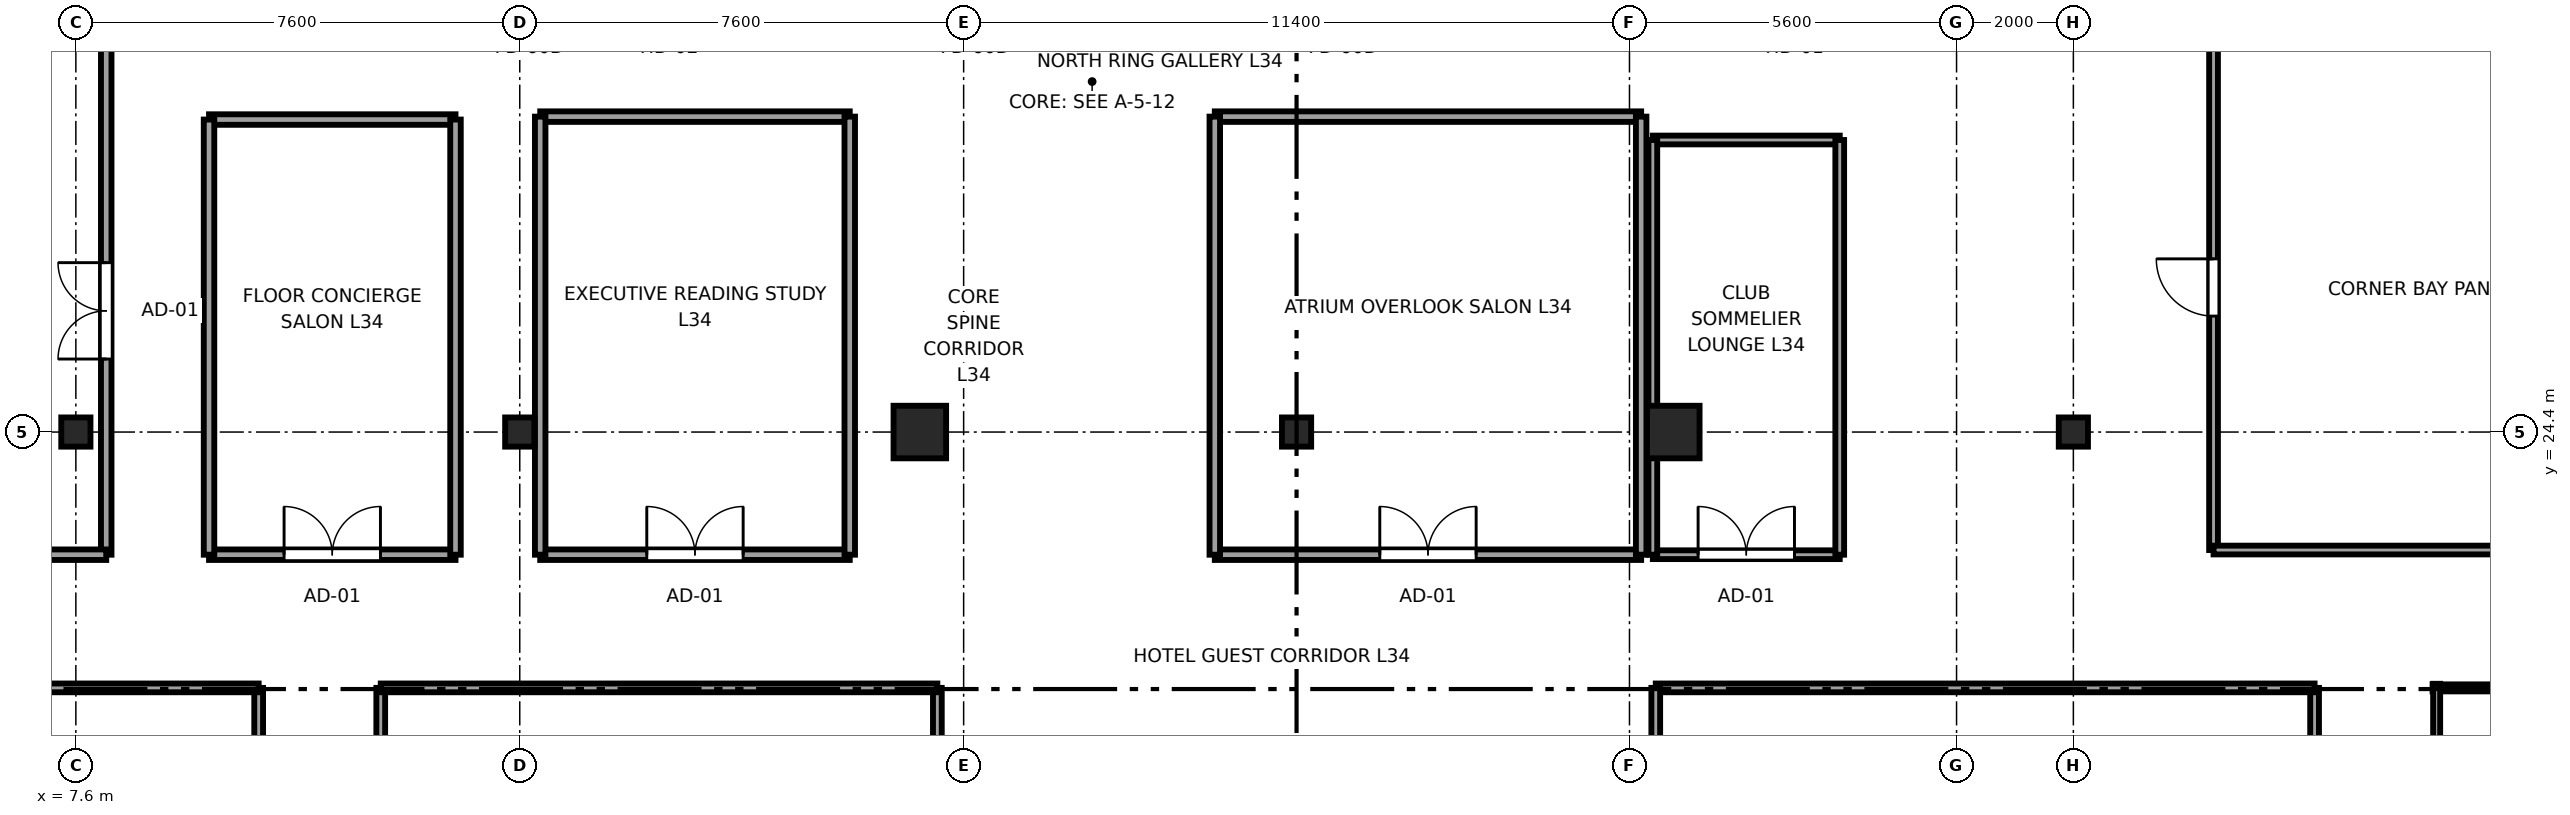
"""IFC4 building model, lengths in metres.
Left out: names, types, materials, properties, quantities, classifications, styles, units other than length and angle.
Written with IfcOpenShell. Run it as: python <this file> out.ifc"""

import sys

from ifc_helpers import new_model, si_unit, direction, frame, frame_2d, origin, origin_2d, place, context, subcontext, project, spatial, rectangle, i_section, extrude, source, transform, mapped, element, fill, save


model = new_model("IFC4")
c1 = context("Model", 3, precision=1e-05, world=origin(), true_north=direction((0.0, 1.0)))
c2 = subcontext(c1, "Body", "Model", "MODEL_VIEW")
j1 = project(units=[si_unit("LENGTHUNIT", "METRE"), si_unit("PLANEANGLEUNIT", "RADIAN")], contexts=[c1])
p1 = place(None, origin())
s1 = spatial("IfcSite", under=j1, at=p1, CompositionType="ELEMENT")
p2 = place(p1, origin())
s2 = spatial("IfcBuilding", under=s1, at=p2, CompositionType="ELEMENT")
p3 = place(p2, frame((0.0, 0.0, 132.85)))
s3 = spatial("IfcBuildingStorey", under=s2, at=p3, CompositionType="ELEMENT", Elevation=132.85)
m1 = source(origin(), c2, "Body", "SweptSolid", [
    extrude(i_section(OverallWidth=0.5, OverallDepth=0.5, WebThickness=0.022, FlangeThickness=0.034, at=origin_2d()), origin(), (0.0, 0.0, 1.0), 3.55),
])
for number, where, z_axis, x_axis in (
    (1, (7.6, 24.4, 0.0), (0.0, 0.0, 1.0), (1.0, 0.0, 0.0)),
    (2, (15.2, 24.4, 0.0), (0.0, 0.0, 1.0), (1.0, 0.0, 0.0)),
):
    element("IfcColumn", number, at=place(p3, frame(where, z_axis=z_axis, x_axis=x_axis)), inside=s3, PredefinedType="COLUMN", context=c2, shape_type="MappedRepresentation", body=[
        mapped(m1, transform((0.0, 0.0, 0.0), x_axis=(1.0, 0.0, 0.0), y_axis=(0.0, 1.0, 0.0), z_axis=(0.0, 0.0, 1.0), scale=1.0)),
    ])
m2 = source(origin(), c2, "Body", "SweptSolid", [
    extrude(rectangle(XDim=0.9, YDim=0.9, at=origin_2d()), origin(), (0.0, 0.0, 1.0), 3.55),
])
for number, where, z_axis, x_axis in (
    (3, (22.05, 24.4, 0.0), (0.0, 0.0, 1.0), (1.0, 0.0, 0.0)),
    (4, (34.95, 24.4, 0.0), (0.0, 0.0, 1.0), (1.0, 0.0, 0.0)),
):
    element("IfcColumn", number, at=place(p3, frame(where, z_axis=z_axis, x_axis=x_axis)), inside=s3, PredefinedType="COLUMN", context=c2, shape_type="MappedRepresentation", body=[
        mapped(m2, transform((0.0, 0.0, 0.0), x_axis=(1.0, 0.0, 0.0), y_axis=(0.0, 1.0, 0.0), z_axis=(0.0, 0.0, 1.0), scale=1.0)),
    ])
for number, where, z_axis, x_axis in (
    (5, (41.8, 24.4, 0.0), (0.0, 0.0, 1.0), (1.0, 0.0, 0.0)),
    (6, (28.5, 24.4, 0.0), (0.0, 0.0, 1.0), (1.0, 0.0, 0.0)),
):
    element("IfcColumn", number, at=place(p3, frame(where, z_axis=z_axis, x_axis=x_axis)), inside=s3, PredefinedType="COLUMN", context=c2, shape_type="MappedRepresentation", body=[
        mapped(m1, transform((0.0, 0.0, 0.0), x_axis=(1.0, 0.0, 0.0), y_axis=(0.0, 1.0, 0.0), z_axis=(0.0, 0.0, 1.0), scale=1.0)),
    ])
p4 = place(p3, frame((47.95, 20.02, 0.0), z_axis=(0.0, 0.0, 1.0), x_axis=(1.0, 0.0, 0.0)))
e7 = element("IfcWall", 7, at=p4, inside=s3, PredefinedType="PLUMBINGWALL", context=c2, shape_type="SweptSolid", body=[
    extrude(rectangle(XDim=2.59, YDim=0.12, at=frame_2d((1.295, 0.0))), origin(), (0.0, 0.0, 1.0), 3.37),
])
p5 = place(p3, frame((48.02, 17.997, 0.0), z_axis=(0.0, 0.0, 1.0), x_axis=(0.0, 1.0, 0.0)))
e8 = element("IfcWall", 8, at=p5, inside=s3, PredefinedType="PLUMBINGWALL", context=c2, shape_type="SweptSolid", body=[
    extrude(rectangle(XDim=2.093, YDim=0.12, at=frame_2d((1.046, 0.0))), origin(), (0.0, 0.0, 1.0), 3.37),
])
p6 = place(p3, frame((10.73, 17.037, 0.0), z_axis=(0.0, 0.0, 1.0), x_axis=(0.0, 1.0, 0.0)))
e9 = element("IfcWall", 9, at=p6, inside=s3, PredefinedType="PARTITIONING", context=c2, shape_type="SweptSolid", body=[
    extrude(rectangle(XDim=2.983, YDim=0.15, at=frame_2d((1.491, 0.0))), origin(), (0.0, 0.0, 1.0), 3.37),
])
p7 = place(p6, frame((0.981, 0.0, 0.0)))
e10 = element("IfcOpeningElement", 10, at=p7, cuts=e9, PredefinedType="OPENING", context=c2, shape_type="SweptSolid", body=[
    extrude(rectangle(XDim=0.98, YDim=2.12, at=frame_2d((0.49, 1.06))), frame((0.0, 0.085, 0.0), z_axis=(0.0, -1.0, 0.0), x_axis=(1.0, 0.0, 0.0)), (0.0, 0.0, 1.0), 0.17),
])
p8 = place(p3, frame((0.405, 20.02, 0.0), z_axis=(0.0, 0.0, 1.0), x_axis=(1.0, 0.0, 0.0)))
e11 = element("IfcWall", 11, at=p8, inside=s3, PredefinedType="PARTITIONING", context=c2, shape_type="SweptSolid", body=[
    extrude(rectangle(XDim=10.325, YDim=0.15, at=frame_2d((5.163, 0.0))), origin(), (0.0, 0.0, 1.0), 3.37),
])
p9 = place(p3, frame((12.82, 15.81, 0.0), z_axis=(0.0, 0.0, 1.0), x_axis=(0.0, 1.0, 0.0)))
e12 = element("IfcWall", 12, at=p9, inside=s3, PredefinedType="PARTITIONING", context=c2, shape_type="SweptSolid", body=[
    extrude(rectangle(XDim=4.21, YDim=0.15, at=frame_2d((2.105, 0.0))), origin(), (0.0, 0.0, 1.0), 3.37),
])
p10 = place(p9, frame((1.595, 0.0, 0.0)))
e13 = element("IfcOpeningElement", 13, at=p10, cuts=e12, PredefinedType="OPENING", context=c2, shape_type="SweptSolid", body=[
    extrude(rectangle(XDim=0.98, YDim=2.12, at=frame_2d((0.49, 1.06))), frame((0.0, 0.085, 0.0), z_axis=(0.0, -1.0, 0.0), x_axis=(1.0, 0.0, 0.0)), (0.0, 0.0, 1.0), 0.17),
])
p11 = place(p3, frame((22.35, 13.48, 0.0), z_axis=(0.0, 0.0, 1.0), x_axis=(0.0, 1.0, 0.0)))
e14 = element("IfcWall", 14, at=p11, inside=s3, PredefinedType="PARTITIONING", context=c2, shape_type="SweptSolid", body=[
    extrude(rectangle(XDim=6.54, YDim=0.15, at=frame_2d((3.27, 0.0))), origin(), (0.0, 0.0, 1.0), 3.37),
])
p12 = place(p3, frame((12.82, 20.02, 0.0), z_axis=(0.0, 0.0, 1.0), x_axis=(1.0, 0.0, 0.0)))
e15 = element("IfcWall", 15, at=p12, inside=s3, PredefinedType="PARTITIONING", context=c2, shape_type="SweptSolid", body=[
    extrude(rectangle(XDim=9.53, YDim=0.15, at=frame_2d((4.765, 0.0))), origin(), (0.0, 0.0, 1.0), 2.954),
])
p13 = place(p3, frame((45.93, 15.81, 0.0), z_axis=(0.0, 0.0, 1.0), x_axis=(0.0, 1.0, 0.0)))
e16 = element("IfcWall", 16, at=p13, inside=s3, PredefinedType="PARTITIONING", context=c2, shape_type="SweptSolid", body=[
    extrude(rectangle(XDim=4.21, YDim=0.15, at=frame_2d((2.105, 0.0))), origin(), (0.0, 0.0, 1.0), 3.37),
])
p14 = place(p13, frame((1.595, 0.0, 0.0)))
e17 = element("IfcOpeningElement", 17, at=p14, cuts=e16, PredefinedType="OPENING", context=c2, shape_type="SweptSolid", body=[
    extrude(rectangle(XDim=0.98, YDim=2.12, at=frame_2d((0.49, 1.06))), frame((0.0, 0.085, 0.0), z_axis=(0.0, -1.0, 0.0), x_axis=(1.0, 0.0, 0.0)), (0.0, 0.0, 1.0), 0.17),
])
p15 = place(p3, frame((34.65, 20.02, 0.0), z_axis=(0.0, 0.0, 1.0), x_axis=(1.0, 0.0, 0.0)))
e18 = element("IfcWall", 18, at=p15, inside=s3, PredefinedType="PARTITIONING", context=c2, shape_type="SweptSolid", body=[
    extrude(rectangle(XDim=11.28, YDim=0.15, at=frame_2d((5.64, 0.0))), origin(), (0.0, 0.0, 1.0), 2.954),
])
p16 = place(p3, frame((34.65, 13.48, 0.0), z_axis=(0.0, 0.0, 1.0), x_axis=(0.0, 1.0, 0.0)))
e19 = element("IfcWall", 19, at=p16, inside=s3, PredefinedType="PARTITIONING", context=c2, shape_type="SweptSolid", body=[
    extrude(rectangle(XDim=6.54, YDim=0.15, at=frame_2d((3.27, 0.0))), origin(), (0.0, 0.0, 1.0), 3.37),
])
p17 = place(p3, frame((8.12, 22.3, 0.0), z_axis=(0.0, 0.0, 1.0), x_axis=(0.0, 1.0, 0.0)))
e20 = element("IfcWall", 20, at=p17, inside=s3, PredefinedType="PARTITIONING", context=c2, shape_type="SweptSolid", body=[
    extrude(rectangle(XDim=13.5, YDim=0.18, at=frame_2d((6.75, 0.0))), origin(), (0.0, 0.0, 1.0), 3.37),
])
p18 = place(p17, frame((3.35, 0.0, 0.0)))
e21 = element("IfcOpeningElement", 21, at=p18, cuts=e20, PredefinedType="OPENING", context=c2, shape_type="SweptSolid", body=[
    extrude(rectangle(XDim=1.65, YDim=2.15, at=frame_2d((0.825, 1.075))), frame((0.0, 0.1, 0.0), z_axis=(0.0, -1.0, 0.0), x_axis=(1.0, 0.0, 0.0)), (0.0, 0.0, 1.0), 0.2),
])
p19 = place(p3, frame((0.405, 22.3, 0.0), z_axis=(0.0, 0.0, 1.0), x_axis=(1.0, 0.0, 0.0)))
e22 = element("IfcWall", 22, at=p19, inside=s3, PredefinedType="PARTITIONING", context=c2, shape_type="SweptSolid", body=[
    extrude(rectangle(XDim=7.715, YDim=0.18, at=frame_2d((3.857, 0.0))), origin(), (0.0, 0.0, 1.0), 3.37),
])
p20 = place(p3, frame((44.2, 22.38, 0.0), z_axis=(0.0, 0.0, 1.0), x_axis=(0.0, 1.0, 0.0)))
e23 = element("IfcWall", 23, at=p20, inside=s3, PredefinedType="PARTITIONING", context=c2, shape_type="SweptSolid", body=[
    extrude(rectangle(XDim=8.99, YDim=0.15, at=frame_2d((4.495, 0.0))), origin(), (0.0, 0.0, 1.0), 3.37),
])
p21 = place(p20, frame((4.005, 0.0, 0.0)))
e24 = element("IfcOpeningElement", 24, at=p21, cuts=e23, PredefinedType="OPENING", context=c2, shape_type="SweptSolid", body=[
    extrude(rectangle(XDim=0.98, YDim=2.12, at=frame_2d((0.49, 1.06))), frame((0.0, 0.085, 0.0), z_axis=(0.0, -1.0, 0.0), x_axis=(1.0, 0.0, 0.0)), (0.0, 0.0, 1.0), 0.17),
])
p22 = place(p3, frame((44.2, 22.38, 0.0), z_axis=(0.0, 0.0, 1.0), x_axis=(1.0, 0.0, 0.0)))
e25 = element("IfcWall", 25, at=p22, inside=s3, PredefinedType="PARTITIONING", context=c2, shape_type="SweptSolid", body=[
    extrude(rectangle(XDim=12.395, YDim=0.15, at=frame_2d((6.198, 0.0))), origin(), (0.0, 0.0, 1.0), 3.37),
])
p23 = place(p3, frame((9.88, 22.3, 0.0), z_axis=(0.0, 0.0, 1.0), x_axis=(1.0, 0.0, 0.0)))
e26 = element("IfcWall", 26, at=p23, inside=s3, PredefinedType="PARTITIONING", context=c2, shape_type="SweptSolid", body=[
    extrude(rectangle(XDim=4.22, YDim=0.18, at=frame_2d((2.11, 0.0))), origin(), (0.0, 0.0, 1.0), 3.37),
])
p24 = place(p23, frame((1.285, 0.0, 0.0)))
e27 = element("IfcOpeningElement", 27, at=p24, cuts=e26, PredefinedType="OPENING", context=c2, shape_type="SweptSolid", body=[
    extrude(rectangle(XDim=1.65, YDim=2.15, at=frame_2d((0.825, 1.075))), frame((0.0, 0.1, 0.0), z_axis=(0.0, -1.0, 0.0), x_axis=(1.0, 0.0, 0.0)), (0.0, 0.0, 1.0), 0.2),
])
p25 = place(p3, frame((9.88, 29.75, 0.0), z_axis=(0.0, 0.0, 1.0), x_axis=(1.0, 0.0, 0.0)))
e28 = element("IfcWall", 28, at=p25, inside=s3, PredefinedType="PARTITIONING", context=c2, shape_type="SweptSolid", body=[
    extrude(rectangle(XDim=4.22, YDim=0.18, at=frame_2d((2.11, 0.0))), origin(), (0.0, 0.0, 1.0), 3.37),
])
for number, where, z_axis, x_axis in (
    (29, (9.88, 22.3, 0.0), (0.0, 0.0, 1.0), (0.0, 1.0, 0.0)),
    (30, (14.1, 22.3, 0.0), (0.0, 0.0, 1.0), (0.0, 1.0, 0.0)),
):
    element("IfcWall", number, at=place(p3, frame(where, z_axis=z_axis, x_axis=x_axis)), inside=s3, PredefinedType="PARTITIONING", context=c2, shape_type="SweptSolid", body=[
        extrude(rectangle(XDim=7.45, YDim=0.18, at=frame_2d((3.725, 0.0))), origin(), (0.0, 0.0, 1.0), 3.37),
    ])
p26 = place(p3, frame((27.1, 22.3, 0.0), z_axis=(0.0, 0.0, 1.0), x_axis=(1.0, 0.0, 0.0)))
e31 = element("IfcWall", 31, at=p26, inside=s3, PredefinedType="PARTITIONING", context=c2, shape_type="SweptSolid", body=[
    extrude(rectangle(XDim=7.3, YDim=0.18, at=frame_2d((3.65, 0.0))), origin(), (0.0, 0.0, 1.0), 3.37),
])
p27 = place(p26, frame((2.825, 0.0, 0.0)))
e32 = element("IfcOpeningElement", 32, at=p27, cuts=e31, PredefinedType="OPENING", context=c2, shape_type="SweptSolid", body=[
    extrude(rectangle(XDim=1.65, YDim=2.15, at=frame_2d((0.825, 1.075))), frame((0.0, 0.1, 0.0), z_axis=(0.0, -1.0, 0.0), x_axis=(1.0, 0.0, 0.0)), (0.0, 0.0, 1.0), 0.2),
])
p28 = place(p3, frame((27.1, 29.8, 0.0), z_axis=(0.0, 0.0, 1.0), x_axis=(1.0, 0.0, 0.0)))
e33 = element("IfcWall", 33, at=p28, inside=s3, PredefinedType="PARTITIONING", context=c2, shape_type="SweptSolid", body=[
    extrude(rectangle(XDim=7.3, YDim=0.18, at=frame_2d((3.65, 0.0))), origin(), (0.0, 0.0, 1.0), 3.37),
])
for number, where, z_axis, x_axis in (
    (34, (27.1, 22.3, 0.0), (0.0, 0.0, 1.0), (0.0, 1.0, 0.0)),
    (35, (34.4, 22.3, 0.0), (0.0, 0.0, 1.0), (0.0, 1.0, 0.0)),
):
    element("IfcWall", number, at=place(p3, frame(where, z_axis=z_axis, x_axis=x_axis)), inside=s3, PredefinedType="PARTITIONING", context=c2, shape_type="SweptSolid", body=[
        extrude(rectangle(XDim=7.5, YDim=0.18, at=frame_2d((3.75, 0.0))), origin(), (0.0, 0.0, 1.0), 3.37),
    ])
p29 = place(p3, frame((15.55, 22.3, 0.0), z_axis=(0.0, 0.0, 1.0), x_axis=(1.0, 0.0, 0.0)))
e36 = element("IfcWall", 36, at=p29, inside=s3, PredefinedType="PARTITIONING", context=c2, shape_type="SweptSolid", body=[
    extrude(rectangle(XDim=5.3, YDim=0.18, at=frame_2d((2.65, 0.0))), origin(), (0.0, 0.0, 1.0), 3.37),
])
p30 = place(p29, frame((1.825, 0.0, 0.0)))
e37 = element("IfcOpeningElement", 37, at=p30, cuts=e36, PredefinedType="OPENING", context=c2, shape_type="SweptSolid", body=[
    extrude(rectangle(XDim=1.65, YDim=2.15, at=frame_2d((0.825, 1.075))), frame((0.0, 0.1, 0.0), z_axis=(0.0, -1.0, 0.0), x_axis=(1.0, 0.0, 0.0)), (0.0, 0.0, 1.0), 0.2),
])
p31 = place(p3, frame((15.55, 29.8, 0.0), z_axis=(0.0, 0.0, 1.0), x_axis=(1.0, 0.0, 0.0)))
e38 = element("IfcWall", 38, at=p31, inside=s3, PredefinedType="PARTITIONING", context=c2, shape_type="SweptSolid", body=[
    extrude(rectangle(XDim=5.3, YDim=0.18, at=frame_2d((2.65, 0.0))), origin(), (0.0, 0.0, 1.0), 3.37),
])
for number, where, z_axis, x_axis in (
    (39, (15.55, 22.3, 0.0), (0.0, 0.0, 1.0), (0.0, 1.0, 0.0)),
    (40, (20.85, 22.3, 0.0), (0.0, 0.0, 1.0), (0.0, 1.0, 0.0)),
):
    element("IfcWall", number, at=place(p3, frame(where, z_axis=z_axis, x_axis=x_axis)), inside=s3, PredefinedType="PARTITIONING", context=c2, shape_type="SweptSolid", body=[
        extrude(rectangle(XDim=7.5, YDim=0.18, at=frame_2d((3.75, 0.0))), origin(), (0.0, 0.0, 1.0), 3.37),
    ])
p32 = place(p3, frame((34.6, 22.3, 0.0), z_axis=(0.0, 0.0, 1.0), x_axis=(1.0, 0.0, 0.0)))
e41 = element("IfcWall", 41, at=p32, inside=s3, PredefinedType="PARTITIONING", context=c2, shape_type="SweptSolid", body=[
    extrude(rectangle(XDim=3.2, YDim=0.15, at=frame_2d((1.6, 0.0))), origin(), (0.0, 0.0, 1.0), 3.37),
])
p33 = place(p32, frame((0.775, 0.0, 0.0)))
e42 = element("IfcOpeningElement", 42, at=p33, cuts=e41, PredefinedType="OPENING", context=c2, shape_type="SweptSolid", body=[
    extrude(rectangle(XDim=1.65, YDim=2.15, at=frame_2d((0.825, 1.075))), frame((0.0, 0.085, 0.0), z_axis=(0.0, -1.0, 0.0), x_axis=(1.0, 0.0, 0.0)), (0.0, 0.0, 1.0), 0.17),
])
p34 = place(p3, frame((34.6, 29.4, 0.0), z_axis=(0.0, 0.0, 1.0), x_axis=(1.0, 0.0, 0.0)))
e43 = element("IfcWall", 43, at=p34, inside=s3, PredefinedType="PARTITIONING", context=c2, shape_type="SweptSolid", body=[
    extrude(rectangle(XDim=3.2, YDim=0.15, at=frame_2d((1.6, 0.0))), origin(), (0.0, 0.0, 1.0), 3.37),
])
for number, where, z_axis, x_axis in (
    (44, (34.6, 22.3, 0.0), (0.0, 0.0, 1.0), (0.0, 1.0, 0.0)),
    (45, (37.8, 22.3, 0.0), (0.0, 0.0, 1.0), (0.0, 1.0, 0.0)),
):
    element("IfcWall", number, at=place(p3, frame(where, z_axis=z_axis, x_axis=x_axis)), inside=s3, PredefinedType="PARTITIONING", context=c2, shape_type="SweptSolid", body=[
        extrude(rectangle(XDim=7.1, YDim=0.15, at=frame_2d((3.55, 0.0))), origin(), (0.0, 0.0, 1.0), 3.37),
    ])
m3 = source(origin(), c2, "Body", "SweptSolid", [
    extrude(rectangle(XDim=1.65, YDim=2.15, at=frame_2d((0.825, 1.075))), frame((0.0, 0.025, 0.0), z_axis=(0.0, -1.0, 0.0), x_axis=(1.0, 0.0, 0.0)), (0.0, 0.0, 1.0), 0.05),
])
p35 = place(p18, origin())
e46 = element("IfcDoor", 46, at=p35, inside=s3, OperationType="DOUBLE_DOOR_SINGLE_SWING", PredefinedType="DOOR", context=c2, shape_type="MappedRepresentation", body=[
    mapped(m3, transform((0.0, 0.0, 0.0), x_axis=(1.0, 0.0, 0.0), y_axis=(0.0, 1.0, 0.0), z_axis=(0.0, 0.0, 1.0), scale=1.0)),
])
fill(e21, e46)
m4 = source(origin(), c2, "Body", "SweptSolid", [
    extrude(rectangle(XDim=0.98, YDim=2.12, at=frame_2d((0.49, 1.06))), frame((0.0, 0.025, 0.0), z_axis=(0.0, -1.0, 0.0), x_axis=(1.0, 0.0, 0.0)), (0.0, 0.0, 1.0), 0.05),
])
p36 = place(p21, origin())
e47 = element("IfcDoor", 47, at=p36, inside=s3, OperationType="SINGLE_SWING_RIGHT", PredefinedType="DOOR", context=c2, shape_type="MappedRepresentation", body=[
    mapped(m4, transform((0.0, 0.0, 0.0), x_axis=(1.0, 0.0, 0.0), y_axis=(0.0, 1.0, 0.0), z_axis=(0.0, 0.0, 1.0), scale=1.0)),
])
fill(e24, e47)
p37 = place(p24, origin())
e48 = element("IfcDoor", 48, at=p37, inside=s3, OperationType="DOUBLE_DOOR_SINGLE_SWING", PredefinedType="DOOR", context=c2, shape_type="MappedRepresentation", body=[
    mapped(m3, transform((0.0, 0.0, 0.0), x_axis=(1.0, 0.0, 0.0), y_axis=(0.0, 1.0, 0.0), z_axis=(0.0, 0.0, 1.0), scale=1.0)),
])
fill(e27, e48)
p38 = place(p27, origin())
e49 = element("IfcDoor", 49, at=p38, inside=s3, OperationType="DOUBLE_DOOR_SINGLE_SWING", PredefinedType="DOOR", context=c2, shape_type="MappedRepresentation", body=[
    mapped(m3, transform((0.0, 0.0, 0.0), x_axis=(1.0, 0.0, 0.0), y_axis=(0.0, 1.0, 0.0), z_axis=(0.0, 0.0, 1.0), scale=1.0)),
])
fill(e32, e49)
p39 = place(p30, origin())
e50 = element("IfcDoor", 50, at=p39, inside=s3, OperationType="DOUBLE_DOOR_SINGLE_SWING", PredefinedType="DOOR", context=c2, shape_type="MappedRepresentation", body=[
    mapped(m3, transform((0.0, 0.0, 0.0), x_axis=(1.0, 0.0, 0.0), y_axis=(0.0, 1.0, 0.0), z_axis=(0.0, 0.0, 1.0), scale=1.0)),
])
fill(e37, e50)
p40 = place(p33, origin())
e51 = element("IfcDoor", 51, at=p40, inside=s3, OperationType="DOUBLE_DOOR_SINGLE_SWING", PredefinedType="DOOR", context=c2, shape_type="MappedRepresentation", body=[
    mapped(m3, transform((0.0, 0.0, 0.0), x_axis=(1.0, 0.0, 0.0), y_axis=(0.0, 1.0, 0.0), z_axis=(0.0, 0.0, 1.0), scale=1.0)),
])
fill(e42, e51)
save(model, sys.argv[1])
